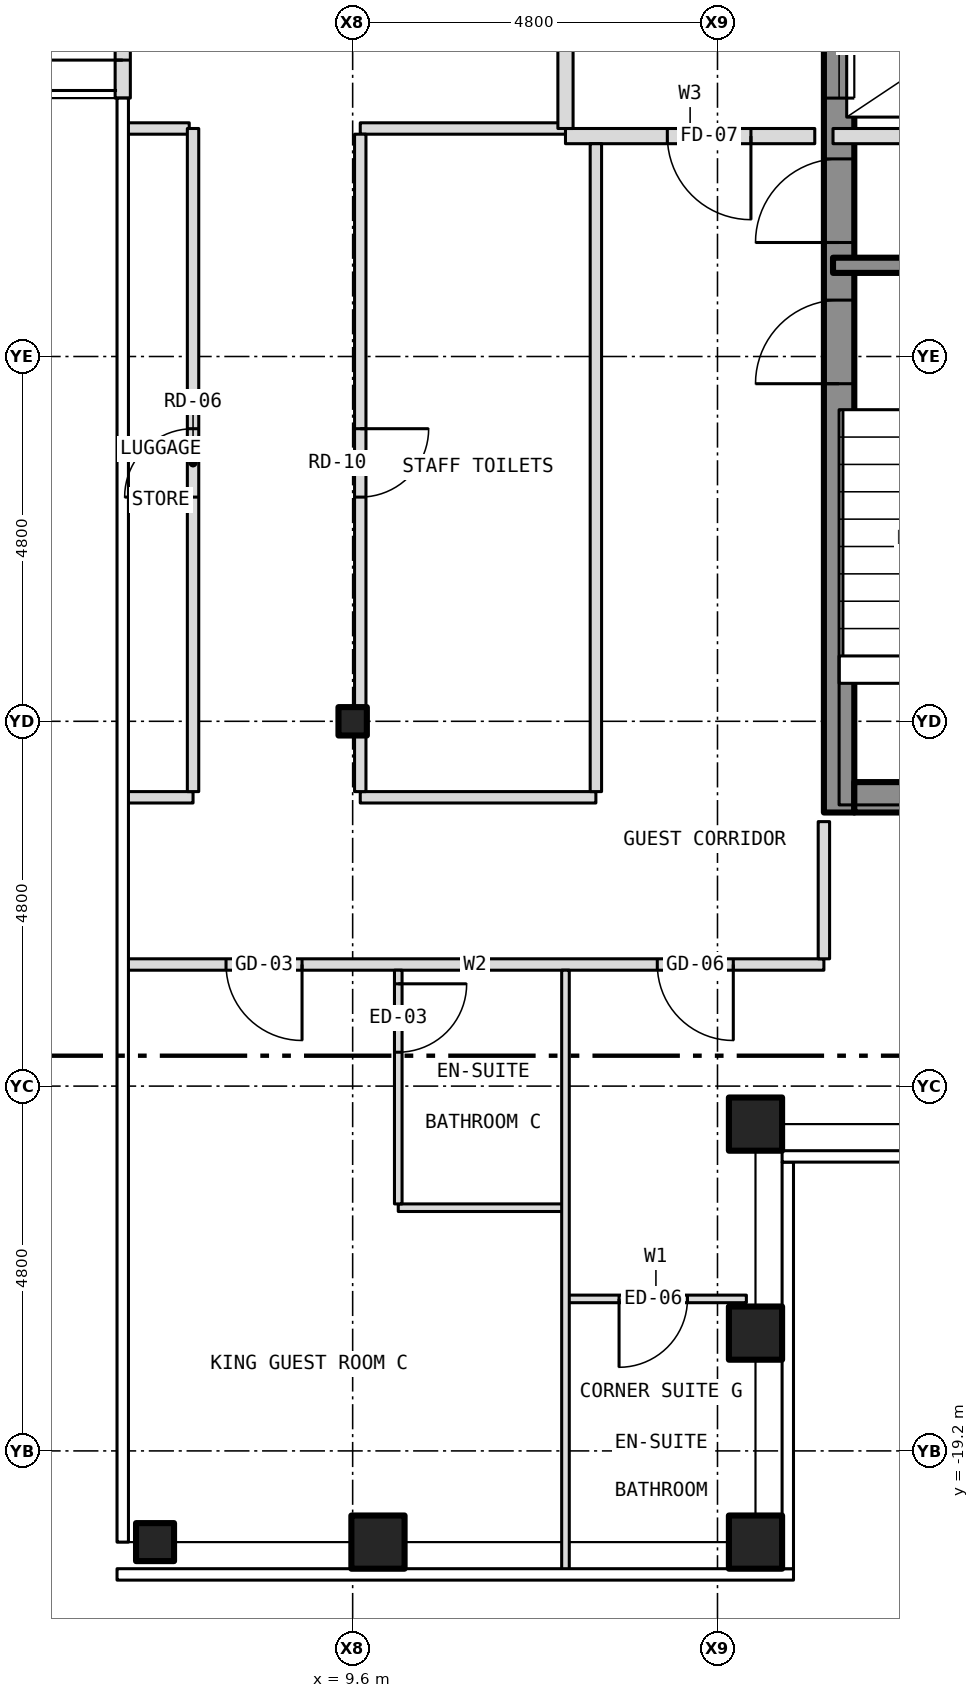
"""IFC4 building model, lengths in metres.
Left out: names, types, materials, properties, quantities, classifications, styles, units other than length and angle.
Written with IfcOpenShell. Run it as: python <this file> out.ifc"""

import sys

from ifc_helpers import new_model, si_unit, direction, frame, frame_2d, origin, origin_2d, place, context, subcontext, project, spatial, rectangle, hollow_rectangle, i_section, extrude, element, fill, save


model = new_model("IFC4")
c1 = context("Model", 3, precision=1e-05, world=origin(), true_north=direction((0.0, 1.0)))
c2 = subcontext(c1, "Body", "Model", "MODEL_VIEW")
j1 = project(units=[si_unit("LENGTHUNIT", "METRE"), si_unit("PLANEANGLEUNIT", "RADIAN")], contexts=[c1])
p1 = place(None, origin())
s1 = spatial("IfcSite", under=j1, at=p1, CompositionType="ELEMENT")
p2 = place(p1, origin())
s2 = spatial("IfcBuilding", under=s1, at=p2, CompositionType="ELEMENT")
p3 = place(p2, frame((0.0, 0.0, 229.5)))
s3 = spatial("IfcBuildingStorey", under=s2, at=p3, CompositionType="ELEMENT", Elevation=229.5)
for number, where, z_axis, x_axis in (
    (1, (9.933, -20.4, -0.15), (0.0, 0.0, 1.0), (1.0, 0.0, 0.0)),
    (2, (14.9, -20.4, -0.15), (0.0, 0.0, 1.0), (1.0, 0.0, 0.0)),
    (3, (14.9, -14.9, -0.15), (0.0, 0.0, 1.0), (1.0, 0.0, 0.0)),
    (4, (14.9, -17.65, -0.15), (0.0, 0.0, 1.0), (1.0, 0.0, 0.0)),
):
    element("IfcColumn", number, at=place(p3, frame(where, z_axis=z_axis, x_axis=x_axis)), inside=s3, PredefinedType="COLUMN", context=c2, shape_type="SweptSolid", body=[
        extrude(hollow_rectangle(XDim=0.7, YDim=0.7, WallThickness=0.04, at=origin_2d()), origin(), (0.0, 0.0, 1.0), 3.5),
    ])
p4 = place(p3, frame((7.0, -20.4, -0.15), z_axis=(0.0, 0.0, 1.0), x_axis=(1.0, 0.0, 0.0)))
e5 = element("IfcColumn", 5, at=p4, inside=s3, PredefinedType="COLUMN", context=c2, shape_type="SweptSolid", body=[
    extrude(hollow_rectangle(XDim=0.5, YDim=0.5, WallThickness=0.03, at=origin_2d()), origin(), (0.0, 0.0, 1.0), 3.5),
])
p5 = place(p3, frame((9.6, -9.6, -0.15), z_axis=(0.0, 0.0, 1.0), x_axis=(1.0, 0.0, 0.0)))
e6 = element("IfcColumn", 6, at=p5, inside=s3, PredefinedType="COLUMN", context=c2, shape_type="SweptSolid", body=[
    extrude(i_section(OverallWidth=0.373, OverallDepth=0.373, WebThickness=0.016, FlangeThickness=0.026, at=origin_2d()), origin(), (0.0, 0.0, 1.0), 3.5),
])
p6 = place(p3, frame((16.0, -10.8, 0.0), z_axis=(0.0, 0.0, 1.0), x_axis=(0.0, 1.0, 0.0)))
e7 = element("IfcWall", 7, at=p6, inside=s3, PredefinedType="SHEAR", context=c2, shape_type="SweptSolid", body=[
    extrude(rectangle(XDim=21.6, YDim=0.4, at=frame_2d((10.8, 0.0))), origin(), (0.0, 0.0, 1.0), 3.25),
])
p7 = place(p6, frame((9.4, 0.0, 0.0)))
e8 = element("IfcOpeningElement", 8, at=p7, cuts=e7, PredefinedType="OPENING", context=c2, shape_type="SweptSolid", body=[
    extrude(rectangle(XDim=1.1, YDim=2.1, at=frame_2d((0.55, 1.05))), frame((0.0, 0.212, 0.0), z_axis=(0.0, -1.0, 0.0), x_axis=(1.0, 0.0, 0.0)), (0.0, 0.0, 1.0), 0.424),
])
p8 = place(p6, frame((11.5, 0.0, 0.0)))
e9 = element("IfcOpeningElement", 9, at=p8, cuts=e7, PredefinedType="OPENING", context=c2, shape_type="SweptSolid", body=[
    extrude(rectangle(XDim=1.1, YDim=2.1, at=frame_2d((0.55, 1.05))), frame((0.0, 0.212, 0.0), z_axis=(0.0, -1.0, 0.0), x_axis=(1.0, 0.0, 0.0)), (0.0, 0.0, 1.0), 0.424),
])
p9 = place(p6, frame((13.6, 0.0, 0.0)))
e10 = element("IfcOpeningElement", 10, at=p9, cuts=e7, PredefinedType="OPENING", context=c2, shape_type="SweptSolid", body=[
    extrude(rectangle(XDim=1.1, YDim=2.1, at=frame_2d((0.55, 1.05))), frame((0.0, 0.212, 0.0), z_axis=(0.0, -1.0, 0.0), x_axis=(1.0, 0.0, 0.0)), (0.0, 0.0, 1.0), 0.424),
])
p10 = place(p6, frame((15.7, 0.0, 0.0)))
e11 = element("IfcOpeningElement", 11, at=p10, cuts=e7, PredefinedType="OPENING", context=c2, shape_type="SweptSolid", body=[
    extrude(rectangle(XDim=1.1, YDim=2.1, at=frame_2d((0.55, 1.05))), frame((0.0, 0.212, 0.0), z_axis=(0.0, -1.0, 0.0), x_axis=(1.0, 0.0, 0.0)), (0.0, 0.0, 1.0), 0.424),
])
p11 = place(p6, frame((17.8, 0.0, 0.0)))
e12 = element("IfcOpeningElement", 12, at=p11, cuts=e7, PredefinedType="OPENING", context=c2, shape_type="SweptSolid", body=[
    extrude(rectangle(XDim=1.1, YDim=2.1, at=frame_2d((0.55, 1.05))), frame((0.0, 0.212, 0.0), z_axis=(0.0, -1.0, 0.0), x_axis=(1.0, 0.0, 0.0)), (0.0, 0.0, 1.0), 0.424),
])
p12 = place(p6, frame((5.642, 0.0, 0.0)))
e13 = element("IfcOpeningElement", 13, at=p12, cuts=e7, PredefinedType="OPENING", context=c2, shape_type="SweptSolid", body=[
    extrude(rectangle(XDim=1.1, YDim=2.1, at=frame_2d((0.55, 1.05))), frame((0.0, 0.212, 0.0), z_axis=(0.0, -1.0, 0.0), x_axis=(1.0, 0.0, 0.0)), (0.0, 0.0, 1.0), 0.424),
])
p13 = place(p6, frame((7.5, 0.0, 0.0)))
e14 = element("IfcOpeningElement", 14, at=p13, cuts=e7, PredefinedType="OPENING", context=c2, shape_type="SweptSolid", body=[
    extrude(rectangle(XDim=1.1, YDim=2.1, at=frame_2d((0.55, 1.05))), frame((0.0, 0.212, 0.0), z_axis=(0.0, -1.0, 0.0), x_axis=(1.0, 0.0, 0.0)), (0.0, 0.0, 1.0), 0.424),
])
p14 = place(p6, frame((20.0, 0.0, 0.0)))
e15 = element("IfcOpeningElement", 15, at=p14, cuts=e7, PredefinedType="OPENING", context=c2, shape_type="SweptSolid", body=[
    extrude(rectangle(XDim=0.9, YDim=2.1, at=frame_2d((0.45, 1.05))), frame((0.0, 0.212, 0.0), z_axis=(0.0, -1.0, 0.0), x_axis=(1.0, 0.0, 0.0)), (0.0, 0.0, 1.0), 0.424),
])
p15 = place(p3, frame((16.2, -10.6, 0.0), z_axis=(0.0, 0.0, 1.0), x_axis=(1.0, 0.0, 0.0)))
e16 = element("IfcWall", 16, at=p15, inside=s3, PredefinedType="SHEAR", context=c2, shape_type="SweptSolid", body=[
    extrude(rectangle(XDim=3.8, YDim=0.4, at=frame_2d((1.9, 0.0))), origin(), (0.0, 0.0, 1.0), 3.25),
])
p16 = place(p3, frame((6.575, -1.4, 0.0), z_axis=(0.0, 0.0, 1.0), x_axis=(0.0, 1.0, 0.0)))
e17 = element("IfcWall", 17, at=p16, inside=s3, PredefinedType="SOLIDWALL", context=c2, shape_type="SweptSolid", body=[
    extrude(rectangle(XDim=2.8, YDim=0.2, at=frame_2d((1.4, 0.0))), origin(), (0.0, 0.0, 1.0), 3.5),
])
p17 = place(p16, frame((0.5, 0.0, 0.0)))
e18 = element("IfcOpeningElement", 18, at=p17, cuts=e17, PredefinedType="OPENING", context=c2, shape_type="SweptSolid", body=[
    extrude(rectangle(XDim=1.8, YDim=2.1, at=frame_2d((0.9, 1.05))), frame((0.0, 0.112, 0.0), z_axis=(0.0, -1.0, 0.0), x_axis=(1.0, 0.0, 0.0)), (0.0, 0.0, 1.0), 0.224),
])
p18 = place(p3, frame((12.4, -17.2, 0.0), z_axis=(0.0, 0.0, 1.0), x_axis=(1.0, 0.0, 0.0)))
e19 = element("IfcWall", 19, at=p18, inside=s3, PredefinedType="PARTITIONING", context=c2, shape_type="SweptSolid", body=[
    extrude(rectangle(XDim=2.38, YDim=0.1, at=frame_2d((1.19, 0.0))), origin(), (0.0, 0.0, 1.0), 3.35),
])
p19 = place(p18, frame((0.705, 0.0, 0.0)))
e20 = element("IfcOpeningElement", 20, at=p19, cuts=e19, PredefinedType="OPENING", context=c2, shape_type="SweptSolid", body=[
    extrude(rectangle(XDim=0.9, YDim=2.1, at=frame_2d((0.45, 1.05))), frame((0.0, 0.062, 0.0), z_axis=(0.0, -1.0, 0.0), x_axis=(1.0, 0.0, 0.0)), (0.0, 0.0, 1.0), 0.124),
])
p20 = place(p3, frame((10.2, -16.0, 0.0), z_axis=(0.0, 0.0, 1.0), x_axis=(1.0, 0.0, 0.0)))
e21 = element("IfcWall", 21, at=p20, inside=s3, PredefinedType="PARTITIONING", context=c2, shape_type="SweptSolid", body=[
    extrude(rectangle(XDim=2.2, YDim=0.1, at=frame_2d((1.1, 0.0))), origin(), (0.0, 0.0, 1.0), 3.35),
])
p21 = place(p3, frame((6.62, -12.8, 0.0), z_axis=(0.0, 0.0, 1.0), x_axis=(1.0, 0.0, 0.0)))
e22 = element("IfcWall", 22, at=p21, inside=s3, PredefinedType="PARTITIONING", context=c2, shape_type="SweptSolid", body=[
    extrude(rectangle(XDim=9.18, YDim=0.15, at=frame_2d((4.59, 0.0))), origin(), (0.0, 0.0, 1.0), 3.35),
])
p22 = place(p21, frame((1.314, 0.0, 0.0)))
e23 = element("IfcOpeningElement", 23, at=p22, cuts=e22, PredefinedType="OPENING", context=c2, shape_type="SweptSolid", body=[
    extrude(rectangle(XDim=1.0, YDim=2.1, at=frame_2d((0.5, 1.05))), frame((0.0, 0.087, 0.0), z_axis=(0.0, -1.0, 0.0), x_axis=(1.0, 0.0, 0.0)), (0.0, 0.0, 1.0), 0.174),
])
p23 = place(p21, frame((6.988, 0.0, 0.0)))
e24 = element("IfcOpeningElement", 24, at=p23, cuts=e22, PredefinedType="OPENING", context=c2, shape_type="SweptSolid", body=[
    extrude(rectangle(XDim=1.0, YDim=2.1, at=frame_2d((0.5, 1.05))), frame((0.0, 0.087, 0.0), z_axis=(0.0, -1.0, 0.0), x_axis=(1.0, 0.0, 0.0)), (0.0, 0.0, 1.0), 0.174),
])
p24 = place(p3, frame((6.62, -10.6, 0.0), z_axis=(0.0, 0.0, 1.0), x_axis=(1.0, 0.0, 0.0)))
e25 = element("IfcWall", 25, at=p24, inside=s3, PredefinedType="PARTITIONING", context=c2, shape_type="SweptSolid", body=[
    extrude(rectangle(XDim=0.88, YDim=0.15, at=frame_2d((0.44, 0.0))), origin(), (0.0, 0.0, 1.0), 3.35),
])
p25 = place(p3, frame((9.7, -10.6, 0.0), z_axis=(0.0, 0.0, 1.0), x_axis=(1.0, 0.0, 0.0)))
e26 = element("IfcWall", 26, at=p25, inside=s3, PredefinedType="PARTITIONING", context=c2, shape_type="SweptSolid", body=[
    extrude(rectangle(XDim=3.1, YDim=0.15, at=frame_2d((1.55, 0.0))), origin(), (0.0, 0.0, 1.0), 3.35),
])
p26 = place(p3, frame((15.92, -3.6, 0.0), z_axis=(0.0, 0.0, 1.0), x_axis=(1.0, 0.0, 0.0)))
e27 = element("IfcWall", 27, at=p26, inside=s3, PredefinedType="SHEAR", context=c2, shape_type="SweptSolid", body=[
    extrude(rectangle(XDim=4.08, YDim=0.2, at=frame_2d((2.04, 0.0))), origin(), (0.0, 0.0, 1.0), 3.25),
])
p27 = place(p3, frame((12.4, -1.9, 0.0), z_axis=(0.0, 0.0, 1.0), x_axis=(1.0, 0.0, 0.0)))
e28 = element("IfcWall", 28, at=p27, inside=s3, PredefinedType="PARTITIONING", context=c2, shape_type="SweptSolid", body=[
    extrude(rectangle(XDim=3.28, YDim=0.2, at=frame_2d((1.64, 0.0))), origin(), (0.0, 0.0, 1.0), 3.35),
])
p28 = place(p27, frame((1.34, 0.0, 0.0)))
e29 = element("IfcOpeningElement", 29, at=p28, cuts=e28, PredefinedType="OPENING", context=c2, shape_type="SweptSolid", body=[
    extrude(rectangle(XDim=1.1, YDim=2.1, at=frame_2d((0.55, 1.05))), frame((0.0, 0.112, 0.0), z_axis=(0.0, -1.0, 0.0), x_axis=(1.0, 0.0, 0.0)), (0.0, 0.0, 1.0), 0.224),
])
p29 = place(p3, frame((15.92, -1.9, 0.0), z_axis=(0.0, 0.0, 1.0), x_axis=(1.0, 0.0, 0.0)))
e30 = element("IfcWall", 30, at=p29, inside=s3, PredefinedType="PARTITIONING", context=c2, shape_type="SweptSolid", body=[
    extrude(rectangle(XDim=4.36, YDim=0.2, at=frame_2d((2.18, 0.0))), origin(), (0.0, 0.0, 1.0), 3.25),
])
p30 = place(p3, frame((6.62, -1.8, 0.0), z_axis=(0.0, 0.0, 1.0), x_axis=(1.0, 0.0, 0.0)))
e31 = element("IfcWall", 31, at=p30, inside=s3, PredefinedType="PARTITIONING", context=c2, shape_type="SweptSolid", body=[
    extrude(rectangle(XDim=0.83, YDim=0.15, at=frame_2d((0.415, 0.0))), origin(), (0.0, 0.0, 1.0), 3.35),
])
p31 = place(p3, frame((9.7, -1.8, 0.0), z_axis=(0.0, 0.0, 1.0), x_axis=(1.0, 0.0, 0.0)))
e32 = element("IfcWall", 32, at=p31, inside=s3, PredefinedType="PARTITIONING", context=c2, shape_type="SweptSolid", body=[
    extrude(rectangle(XDim=2.7, YDim=0.15, at=frame_2d((1.35, 0.0))), origin(), (0.0, 0.0, 1.0), 3.35),
])
p32 = place(p3, frame((7.5, -10.525, 0.0), z_axis=(0.0, 0.0, 1.0), x_axis=(0.0, 1.0, 0.0)))
e33 = element("IfcWall", 33, at=p32, inside=s3, PredefinedType="PARTITIONING", context=c2, shape_type="SweptSolid", body=[
    extrude(rectangle(XDim=8.725, YDim=0.15, at=frame_2d((4.362, 0.0))), origin(), (0.0, 0.0, 1.0), 3.35),
])
p33 = place(p32, frame((3.875, 0.0, 0.0)))
e34 = element("IfcOpeningElement", 34, at=p33, cuts=e33, PredefinedType="OPENING", context=c2, shape_type="SweptSolid", body=[
    extrude(rectangle(XDim=0.9, YDim=2.1, at=frame_2d((0.45, 1.05))), frame((0.0, 0.087, 0.0), z_axis=(0.0, -1.0, 0.0), x_axis=(1.0, 0.0, 0.0)), (0.0, 0.0, 1.0), 0.174),
])
p34 = place(p3, frame((9.7, -10.525, 0.0), z_axis=(0.0, 0.0, 1.0), x_axis=(0.0, 1.0, 0.0)))
e35 = element("IfcWall", 35, at=p34, inside=s3, PredefinedType="PARTITIONING", context=c2, shape_type="SweptSolid", body=[
    extrude(rectangle(XDim=0.738, YDim=0.15, at=frame_2d((0.369, 0.0))), origin(), (0.0, 0.0, 1.0), 2.728),
])
p35 = place(p3, frame((9.7, -9.787, 0.0), z_axis=(0.0, 0.0, 1.0), x_axis=(0.0, 1.0, 0.0)))
e36 = element("IfcWall", 36, at=p35, inside=s3, PredefinedType="PARTITIONING", context=c2, shape_type="SweptSolid", body=[
    extrude(rectangle(XDim=0.374, YDim=0.15, at=frame_2d((0.187, 0.0))), origin(), (0.0, 0.0, 1.0), 3.35),
])
p36 = place(p3, frame((9.7, -9.413, 0.0), z_axis=(0.0, 0.0, 1.0), x_axis=(0.0, 1.0, 0.0)))
e37 = element("IfcWall", 37, at=p36, inside=s3, PredefinedType="PARTITIONING", context=c2, shape_type="SweptSolid", body=[
    extrude(rectangle(XDim=7.538, YDim=0.15, at=frame_2d((3.769, 0.0))), origin(), (0.0, 0.0, 1.0), 2.728),
])
p37 = place(p36, frame((2.763, 0.0, 0.0)))
e38 = element("IfcOpeningElement", 38, at=p37, cuts=e37, PredefinedType="OPENING", context=c2, shape_type="SweptSolid", body=[
    extrude(rectangle(XDim=0.9, YDim=2.1, at=frame_2d((0.45, 1.05))), frame((0.0, 0.087, 0.0), z_axis=(0.0, -1.0, 0.0), x_axis=(1.0, 0.0, 0.0)), (0.0, 0.0, 1.0), 0.174),
])
p38 = place(p3, frame((10.2, -15.95, 0.0), z_axis=(0.0, 0.0, 1.0), x_axis=(0.0, 1.0, 0.0)))
e39 = element("IfcWall", 39, at=p38, inside=s3, PredefinedType="PARTITIONING", context=c2, shape_type="SweptSolid", body=[
    extrude(rectangle(XDim=3.075, YDim=0.1, at=frame_2d((1.538, 0.0))), origin(), (0.0, 0.0, 1.0), 3.35),
])
p39 = place(p38, frame((1.996, 0.0, 0.0)))
e40 = element("IfcOpeningElement", 40, at=p39, cuts=e39, PredefinedType="OPENING", context=c2, shape_type="SweptSolid", body=[
    extrude(rectangle(XDim=0.9, YDim=2.1, at=frame_2d((0.45, 1.05))), frame((0.0, 0.062, 0.0), z_axis=(0.0, -1.0, 0.0), x_axis=(1.0, 0.0, 0.0)), (0.0, 0.0, 1.0), 0.124),
])
p40 = place(p3, frame((12.4, -20.78, 0.0), z_axis=(0.0, 0.0, 1.0), x_axis=(0.0, 1.0, 0.0)))
e41 = element("IfcWall", 41, at=p40, inside=s3, PredefinedType="PARTITIONING", context=c2, shape_type="SweptSolid", body=[
    extrude(rectangle(XDim=7.905, YDim=0.1, at=frame_2d((3.953, 0.0))), origin(), (0.0, 0.0, 1.0), 3.35),
])
p41 = place(p3, frame((12.4, -1.8, 0.0), z_axis=(0.0, 0.0, 1.0), x_axis=(0.0, 1.0, 0.0)))
e42 = element("IfcWall", 42, at=p41, inside=s3, PredefinedType="PARTITIONING", context=c2, shape_type="SweptSolid", body=[
    extrude(rectangle(XDim=4.0, YDim=0.2, at=frame_2d((2.0, 0.0))), origin(), (0.0, 0.0, 1.0), 3.35),
])
p42 = place(p41, frame((1.25, 0.0, 0.0)))
e43 = element("IfcOpeningElement", 43, at=p42, cuts=e42, PredefinedType="OPENING", context=c2, shape_type="SweptSolid", body=[
    extrude(rectangle(XDim=1.1, YDim=2.1, at=frame_2d((0.55, 1.05))), frame((0.0, 0.112, 0.0), z_axis=(0.0, -1.0, 0.0), x_axis=(1.0, 0.0, 0.0)), (0.0, 0.0, 1.0), 0.224),
])
p43 = place(p3, frame((12.8, -10.525, 0.0), z_axis=(0.0, 0.0, 1.0), x_axis=(0.0, 1.0, 0.0)))
e44 = element("IfcWall", 44, at=p43, inside=s3, PredefinedType="PARTITIONING", context=c2, shape_type="SweptSolid", body=[
    extrude(rectangle(XDim=8.525, YDim=0.15, at=frame_2d((4.262, 0.0))), origin(), (0.0, 0.0, 1.0), 3.35),
])
p44 = place(p3, frame((15.8, -12.725, 0.0), z_axis=(0.0, 0.0, 1.0), x_axis=(0.0, 1.0, 0.0)))
e45 = element("IfcWall", 45, at=p44, inside=s3, PredefinedType="PARTITIONING", context=c2, shape_type="SweptSolid", body=[
    extrude(rectangle(XDim=1.805, YDim=0.15, at=frame_2d((0.903, 0.0))), origin(), (0.0, 0.0, 1.0), 3.35),
])
p45 = place(p17, origin())
e46 = element("IfcDoor", 46, at=p45, inside=s3, OperationType="DOUBLE_DOOR_DOUBLE_SWING", PredefinedType="DOOR", context=c2, shape_type="SweptSolid", body=[
    extrude(rectangle(XDim=1.8, YDim=2.1, at=frame_2d((0.9, 1.05))), frame((0.0, 0.025, 0.0), z_axis=(0.0, -1.0, 0.0), x_axis=(1.0, 0.0, 0.0)), (0.0, 0.0, 1.0), 0.05),
])
fill(e18, e46)
p46 = place(p7, origin())
e47 = element("IfcDoor", 47, at=p46, inside=s3, OperationType="SLIDING_TO_LEFT", PredefinedType="DOOR", context=c2, shape_type="SweptSolid", body=[
    extrude(rectangle(XDim=1.1, YDim=2.1, at=frame_2d((0.55, 1.05))), frame((0.0, 0.025, 0.0), z_axis=(0.0, -1.0, 0.0), x_axis=(1.0, 0.0, 0.0)), (0.0, 0.0, 1.0), 0.05),
])
fill(e8, e47)
p47 = place(p12, origin())
e48 = element("IfcDoor", 48, at=p47, inside=s3, OperationType="SINGLE_SWING_LEFT", PredefinedType="DOOR", context=c2, shape_type="SweptSolid", body=[
    extrude(rectangle(XDim=1.1, YDim=2.1, at=frame_2d((0.55, 1.05))), frame((0.0, 0.025, 0.0), z_axis=(0.0, -1.0, 0.0), x_axis=(1.0, 0.0, 0.0)), (0.0, 0.0, 1.0), 0.05),
])
fill(e13, e48)
p48 = place(p13, origin())
e49 = element("IfcDoor", 49, at=p48, inside=s3, OperationType="SINGLE_SWING_LEFT", PredefinedType="DOOR", context=c2, shape_type="SweptSolid", body=[
    extrude(rectangle(XDim=1.1, YDim=2.1, at=frame_2d((0.55, 1.05))), frame((0.0, 0.025, 0.0), z_axis=(0.0, -1.0, 0.0), x_axis=(1.0, 0.0, 0.0)), (0.0, 0.0, 1.0), 0.05),
])
fill(e14, e49)
p49 = place(p28, origin())
e50 = element("IfcDoor", 50, at=p49, inside=s3, OperationType="SINGLE_SWING_RIGHT", PredefinedType="DOOR", context=c2, shape_type="SweptSolid", body=[
    extrude(rectangle(XDim=1.1, YDim=2.1, at=frame_2d((0.55, 1.05))), frame((0.0, 0.025, 0.0), z_axis=(0.0, -1.0, 0.0), x_axis=(1.0, 0.0, 0.0)), (0.0, 0.0, 1.0), 0.05),
])
fill(e29, e50)
p50 = place(p22, origin())
e51 = element("IfcDoor", 51, at=p50, inside=s3, OperationType="SINGLE_SWING_RIGHT", PredefinedType="DOOR", context=c2, shape_type="SweptSolid", body=[
    extrude(rectangle(XDim=1.0, YDim=2.1, at=frame_2d((0.5, 1.05))), frame((0.0, 0.025, 0.0), z_axis=(0.0, -1.0, 0.0), x_axis=(1.0, 0.0, 0.0)), (0.0, 0.0, 1.0), 0.05),
])
fill(e23, e51)
p51 = place(p39, origin())
e52 = element("IfcDoor", 52, at=p51, inside=s3, OperationType="SINGLE_SWING_RIGHT", PredefinedType="DOOR", context=c2, shape_type="SweptSolid", body=[
    extrude(rectangle(XDim=0.9, YDim=2.1, at=frame_2d((0.45, 1.05))), frame((0.0, 0.025, 0.0), z_axis=(0.0, -1.0, 0.0), x_axis=(1.0, 0.0, 0.0)), (0.0, 0.0, 1.0), 0.05),
])
fill(e40, e52)
p52 = place(p19, origin())
e53 = element("IfcDoor", 53, at=p52, inside=s3, OperationType="SINGLE_SWING_LEFT", PredefinedType="DOOR", context=c2, shape_type="SweptSolid", body=[
    extrude(rectangle(XDim=0.9, YDim=2.1, at=frame_2d((0.45, 1.05))), frame((0.0, 0.025, 0.0), z_axis=(0.0, -1.0, 0.0), x_axis=(1.0, 0.0, 0.0)), (0.0, 0.0, 1.0), 0.05),
])
fill(e20, e53)
p53 = place(p23, origin())
e54 = element("IfcDoor", 54, at=p53, inside=s3, OperationType="SINGLE_SWING_RIGHT", PredefinedType="DOOR", context=c2, shape_type="SweptSolid", body=[
    extrude(rectangle(XDim=1.0, YDim=2.1, at=frame_2d((0.5, 1.05))), frame((0.0, 0.025, 0.0), z_axis=(0.0, -1.0, 0.0), x_axis=(1.0, 0.0, 0.0)), (0.0, 0.0, 1.0), 0.05),
])
fill(e24, e54)
p54 = place(p33, origin())
e55 = element("IfcDoor", 55, at=p54, inside=s3, OperationType="SINGLE_SWING_LEFT", PredefinedType="DOOR", context=c2, shape_type="SweptSolid", body=[
    extrude(rectangle(XDim=0.9, YDim=2.1, at=frame_2d((0.45, 1.05))), frame((0.0, 0.025, 0.0), z_axis=(0.0, -1.0, 0.0), x_axis=(1.0, 0.0, 0.0)), (0.0, 0.0, 1.0), 0.05),
])
fill(e34, e55)
p55 = place(p37, origin())
e56 = element("IfcDoor", 56, at=p55, inside=s3, OperationType="SINGLE_SWING_RIGHT", PredefinedType="DOOR", context=c2, shape_type="SweptSolid", body=[
    extrude(rectangle(XDim=0.9, YDim=2.1, at=frame_2d((0.45, 1.05))), frame((0.0, 0.025, 0.0), z_axis=(0.0, -1.0, 0.0), x_axis=(1.0, 0.0, 0.0)), (0.0, 0.0, 1.0), 0.05),
])
fill(e38, e56)
save(model, sys.argv[1])
